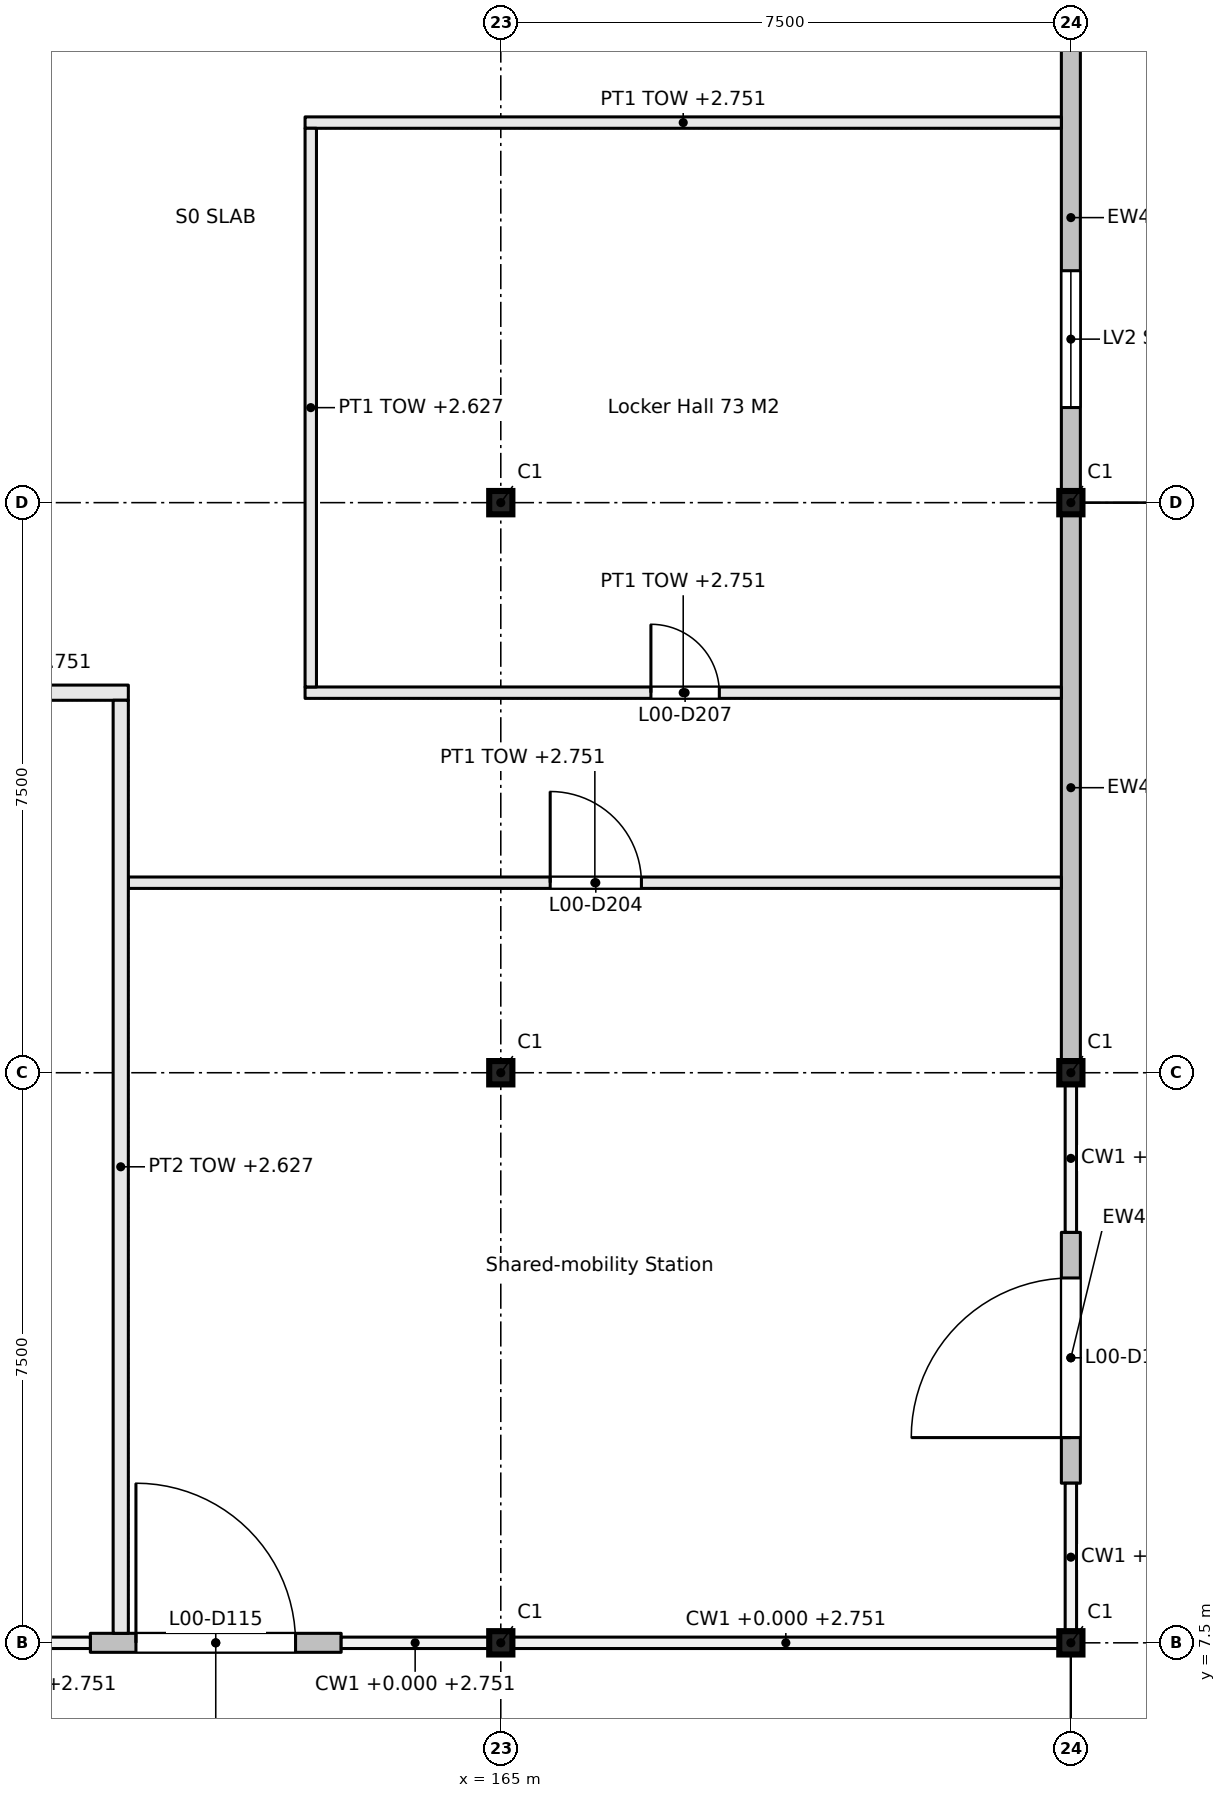
"""IFC4 building model, lengths in metres.
Left out: names, types, materials, properties, quantities, classifications, styles, units other than length and angle.
Written with IfcOpenShell. Run it as: python <this file> out.ifc"""

import sys

from ifc_helpers import new_model, si_unit, direction, frame, frame_2d, origin, origin_2d, place, context, subcontext, project, spatial, rectangle, i_section, extrude, element, fill, save


model = new_model("IFC4")
c1 = context("Model", 3, precision=1e-05, world=origin(), true_north=direction((0.0, 1.0)))
c2 = subcontext(c1, "Body", "Model", "MODEL_VIEW")
j1 = project(units=[si_unit("LENGTHUNIT", "METRE"), si_unit("PLANEANGLEUNIT", "RADIAN")], contexts=[c1])
p1 = place(None, origin())
s1 = spatial("IfcSite", under=j1, at=p1, CompositionType="ELEMENT")
p2 = place(p1, origin())
s2 = spatial("IfcBuilding", under=s1, at=p2, CompositionType="ELEMENT")
p3 = place(p2, origin())
s3 = spatial("IfcBuildingStorey", under=s2, at=p3, CompositionType="ELEMENT", Elevation=0.0)
for number, where, z_axis, x_axis in (
    (1, (165.0, 7.5, -0.25), (0.0, 0.0, 1.0), (1.0, 0.0, 0.0)),
    (2, (165.0, 15.0, -0.25), (0.0, 0.0, 1.0), (1.0, 0.0, 0.0)),
    (3, (165.0, 22.5, -0.25), (0.0, 0.0, 1.0), (1.0, 0.0, 0.0)),
    (4, (172.5, 7.5, -0.25), (0.0, 0.0, 1.0), (1.0, 0.0, 0.0)),
    (5, (172.5, 15.0, -0.25), (0.0, 0.0, 1.0), (1.0, 0.0, 0.0)),
    (6, (172.5, 22.5, -0.25), (0.0, 0.0, 1.0), (1.0, 0.0, 0.0)),
):
    element("IfcColumn", number, at=place(p3, frame(where, z_axis=z_axis, x_axis=x_axis)), inside=s3, PredefinedType="COLUMN", context=c2, shape_type="SweptSolid", body=[
        extrude(i_section(OverallWidth=0.305, OverallDepth=0.307, WebThickness=0.01, FlangeThickness=0.015, FilletRadius=0.015, at=origin_2d()), origin(), (0.0, 0.0, 1.0), 3.55),
    ])
p4 = place(p3, frame((160.1, 17.5, 0.0), z_axis=(0.0, 0.0, 1.0), x_axis=(1.0, 0.0, 0.0)))
e7 = element("IfcWall", 7, at=p4, inside=s3, PredefinedType="PARTITIONING", context=c2, shape_type="SweptSolid", body=[
    extrude(rectangle(XDim=12.275, YDim=0.15, at=frame_2d((6.137, 0.0))), origin(), (0.0, 0.0, 1.0), 2.751),
])
p5 = place(p4, frame((5.55, 0.0, 0.0)))
e8 = element("IfcOpeningElement", 8, at=p5, cuts=e7, PredefinedType="OPENING", context=c2, shape_type="SweptSolid", body=[
    extrude(rectangle(XDim=1.2, YDim=2.1, at=frame_2d((0.6, 1.05))), frame((0.0, 0.085, 0.0), z_axis=(0.0, -1.0, 0.0), x_axis=(1.0, 0.0, 0.0)), (0.0, 0.0, 1.0), 0.17),
])
p6 = place(p3, frame((150.125, 20.0, 0.0), z_axis=(0.0, 0.0, 1.0), x_axis=(1.0, 0.0, 0.0)))
e9 = element("IfcWall", 9, at=p6, inside=s3, PredefinedType="PARTITIONING", context=c2, shape_type="SweptSolid", body=[
    extrude(rectangle(XDim=9.975, YDim=0.2, at=frame_2d((4.988, 0.0))), origin(), (0.0, 0.0, 1.0), 2.751),
])
p7 = place(p6, frame((4.425, 0.0, 0.0)))
e10 = element("IfcOpeningElement", 10, at=p7, cuts=e9, PredefinedType="OPENING", context=c2, shape_type="SweptSolid", body=[
    extrude(rectangle(XDim=1.2, YDim=2.1, at=frame_2d((0.6, 1.05))), frame((0.0, 0.11, 0.0), z_axis=(0.0, -1.0, 0.0), x_axis=(1.0, 0.0, 0.0)), (0.0, 0.0, 1.0), 0.22),
])
p8 = place(p3, frame((162.425, 20.0, 0.0), z_axis=(0.0, 0.0, 1.0), x_axis=(1.0, 0.0, 0.0)))
e11 = element("IfcWall", 11, at=p8, inside=s3, PredefinedType="PARTITIONING", context=c2, shape_type="SweptSolid", body=[
    extrude(rectangle(XDim=9.95, YDim=0.15, at=frame_2d((4.975, 0.0))), origin(), (0.0, 0.0, 1.0), 2.751),
])
p9 = place(p8, frame((4.55, 0.0, 0.0)))
e12 = element("IfcOpeningElement", 12, at=p9, cuts=e11, PredefinedType="OPENING", context=c2, shape_type="SweptSolid", body=[
    extrude(rectangle(XDim=0.9, YDim=2.1, at=frame_2d((0.45, 1.05))), frame((0.0, 0.085, 0.0), z_axis=(0.0, -1.0, 0.0), x_axis=(1.0, 0.0, 0.0)), (0.0, 0.0, 1.0), 0.17),
])
p10 = place(p3, frame((162.425, 27.5, 0.0), z_axis=(0.0, 0.0, 1.0), x_axis=(1.0, 0.0, 0.0)))
e13 = element("IfcWall", 13, at=p10, inside=s3, PredefinedType="PARTITIONING", context=c2, shape_type="SweptSolid", body=[
    extrude(rectangle(XDim=9.95, YDim=0.15, at=frame_2d((4.975, 0.0))), origin(), (0.0, 0.0, 1.0), 2.751),
])
p11 = place(p3, frame((160.0, 7.625, 0.0), z_axis=(0.0, 0.0, 1.0), x_axis=(0.0, 1.0, 0.0)))
e14 = element("IfcWall", 14, at=p11, inside=s3, PredefinedType="PARTITIONING", context=c2, shape_type="SweptSolid", body=[
    extrude(rectangle(XDim=12.275, YDim=0.2, at=frame_2d((6.137, 0.0))), origin(), (0.0, 0.0, 1.0), 2.627),
])
p12 = place(p3, frame((162.5, 20.075, 0.0), z_axis=(0.0, 0.0, 1.0), x_axis=(0.0, 1.0, 0.0)))
e15 = element("IfcWall", 15, at=p12, inside=s3, PredefinedType="PARTITIONING", context=c2, shape_type="SweptSolid", body=[
    extrude(rectangle(XDim=7.35, YDim=0.15, at=frame_2d((3.675, 0.0))), origin(), (0.0, 0.0, 1.0), 2.627),
])
p13 = place(p3, frame((159.6, 7.5, 0.0), z_axis=(0.0, 0.0, 1.0), x_axis=(1.0, 0.0, 0.0)))
e16 = element("IfcWall", 16, at=p13, inside=s3, PredefinedType="SOLIDWALL", context=c2, shape_type="SweptSolid", body=[
    extrude(rectangle(XDim=3.3, YDim=0.25, at=frame_2d((1.65, 0.0))), origin(), (0.0, 0.0, 1.0), 2.751),
])
p14 = place(p13, frame((0.6, 0.0, 0.0)))
e17 = element("IfcOpeningElement", 17, at=p14, cuts=e16, PredefinedType="OPENING", context=c2, shape_type="SweptSolid", body=[
    extrude(rectangle(XDim=2.1, YDim=2.4, at=frame_2d((1.05, 1.2))), frame((0.0, 0.135, 0.0), z_axis=(0.0, -1.0, 0.0), x_axis=(1.0, 0.0, 0.0)), (0.0, 0.0, 1.0), 0.27),
])
p15 = place(p3, frame((172.5, 9.6, 0.0), z_axis=(0.0, 0.0, 1.0), x_axis=(0.0, 1.0, 0.0)))
e18 = element("IfcWall", 18, at=p15, inside=s3, PredefinedType="SOLIDWALL", context=c2, shape_type="SweptSolid", body=[
    extrude(rectangle(XDim=3.3, YDim=0.25, at=frame_2d((1.65, 0.0))), origin(), (0.0, 0.0, 1.0), 2.751),
])
p16 = place(p15, frame((0.6, 0.0, 0.0)))
e19 = element("IfcOpeningElement", 19, at=p16, cuts=e18, PredefinedType="OPENING", context=c2, shape_type="SweptSolid", body=[
    extrude(rectangle(XDim=2.1, YDim=2.4, at=frame_2d((1.05, 1.2))), frame((0.0, 0.135, 0.0), z_axis=(0.0, -1.0, 0.0), x_axis=(1.0, 0.0, 0.0)), (0.0, 0.0, 1.0), 0.27),
])
p17 = place(p3, frame((172.5, 15.154, 0.0), z_axis=(0.0, 0.0, 1.0), x_axis=(0.0, 1.0, 0.0)))
e20 = element("IfcWall", 20, at=p17, inside=s3, PredefinedType="SOLIDWALL", context=c2, shape_type="SweptSolid", body=[
    extrude(rectangle(XDim=7.193, YDim=0.25, at=frame_2d((3.596, 0.0))), origin(), (0.0, 0.0, 1.0), 2.751),
])
p18 = place(p3, frame((172.5, 22.654, 0.0), z_axis=(0.0, 0.0, 1.0), x_axis=(0.0, 1.0, 0.0)))
e21 = element("IfcWall", 21, at=p18, inside=s3, PredefinedType="SOLIDWALL", context=c2, shape_type="SweptSolid", body=[
    extrude(rectangle(XDim=7.193, YDim=0.25, at=frame_2d((3.596, 0.0))), origin(), (0.0, 0.0, 1.0), 2.751),
])
p19 = place(p18, frame((1.098, 0.0, 1.1)))
e22 = element("IfcOpeningElement", 22, at=p19, cuts=e21, PredefinedType="OPENING", context=c2, shape_type="SweptSolid", body=[
    extrude(rectangle(XDim=1.8, YDim=1.4, at=frame_2d((0.9, 0.7))), frame((0.0, 0.135, 0.0), z_axis=(0.0, -1.0, 0.0), x_axis=(1.0, 0.0, 0.0)), (0.0, 0.0, 1.0), 0.27),
])
p20 = place(p5, origin())
e23 = element("IfcDoor", 23, at=p20, inside=s3, OperationType="DOUBLE_DOOR_SINGLE_SWING", PredefinedType="DOOR", context=c2, shape_type="SweptSolid", body=[
    extrude(rectangle(XDim=1.2, YDim=2.1, at=frame_2d((0.6, 1.05))), frame((0.0, 0.025, 0.0), z_axis=(0.0, -1.0, 0.0), x_axis=(1.0, 0.0, 0.0)), (0.0, 0.0, 1.0), 0.05),
])
fill(e8, e23)
p21 = place(p9, origin())
e24 = element("IfcDoor", 24, at=p21, inside=s3, OperationType="SINGLE_SWING_LEFT", PredefinedType="DOOR", context=c2, shape_type="SweptSolid", body=[
    extrude(rectangle(XDim=0.9, YDim=2.1, at=frame_2d((0.45, 1.05))), frame((0.0, 0.025, 0.0), z_axis=(0.0, -1.0, 0.0), x_axis=(1.0, 0.0, 0.0)), (0.0, 0.0, 1.0), 0.05),
])
fill(e12, e24)
p22 = place(p14, origin())
e25 = element("IfcDoor", 25, at=p22, inside=s3, OperationType="DOUBLE_DOOR_SINGLE_SWING", PredefinedType="DOOR", context=c2, shape_type="SweptSolid", body=[
    extrude(rectangle(XDim=2.1, YDim=2.4, at=frame_2d((1.05, 1.2))), frame((0.0, 0.025, 0.0), z_axis=(0.0, -1.0, 0.0), x_axis=(1.0, 0.0, 0.0)), (0.0, 0.0, 1.0), 0.05),
])
fill(e17, e25)
p23 = place(p16, origin())
e26 = element("IfcDoor", 26, at=p23, inside=s3, OperationType="DOUBLE_DOOR_SINGLE_SWING", PredefinedType="DOOR", context=c2, shape_type="SweptSolid", body=[
    extrude(rectangle(XDim=2.1, YDim=2.4, at=frame_2d((1.05, 1.2))), frame((0.0, 0.025, 0.0), z_axis=(0.0, -1.0, 0.0), x_axis=(1.0, 0.0, 0.0)), (0.0, 0.0, 1.0), 0.05),
])
fill(e19, e26)
p24 = place(p19, origin())
e27 = element("IfcWindow", 27, at=p24, inside=s3, PartitioningType="SINGLE_PANEL", PredefinedType="WINDOW", context=c2, shape_type="SweptSolid", body=[
    extrude(rectangle(XDim=1.8, YDim=1.4, at=frame_2d((0.9, 0.7))), frame((0.0, 0.03, 0.0), z_axis=(0.0, -1.0, 0.0), x_axis=(1.0, 0.0, 0.0)), (0.0, 0.0, 1.0), 0.06),
])
fill(e22, e27)
save(model, sys.argv[1])
